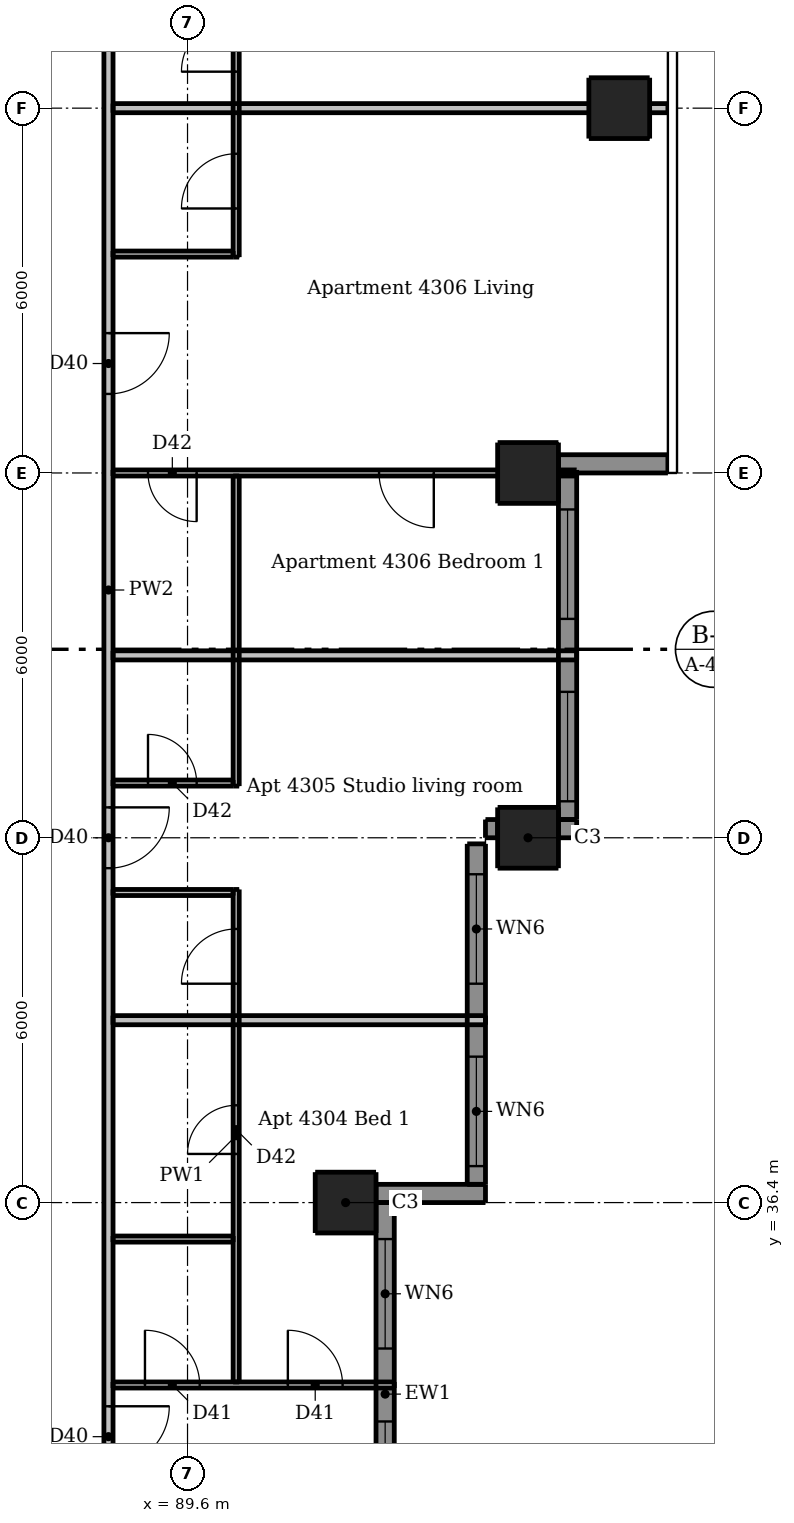
"""IFC4 building model, lengths in metres.
Left out: names, types, materials, properties, quantities, classifications, styles, units other than length and angle.
Written with IfcOpenShell. Run it as: python <this file> out.ifc"""

import sys

from ifc_helpers import new_model, si_unit, direction, frame, frame_2d, origin, origin_2d, place, context, subcontext, project, spatial, rectangle, extrude, element, fill, save


model = new_model("IFC4")
c1 = context("Model", 3, precision=1e-05, world=origin(), true_north=direction((0.0, 1.0)))
c2 = subcontext(c1, "Body", "Model", "MODEL_VIEW")
j1 = project(units=[si_unit("LENGTHUNIT", "METRE"), si_unit("PLANEANGLEUNIT", "RADIAN")], contexts=[c1])
p1 = place(None, origin())
s1 = spatial("IfcSite", under=j1, at=p1, CompositionType="ELEMENT")
p2 = place(p1, origin())
s2 = spatial("IfcBuilding", under=s1, at=p2, CompositionType="ELEMENT")
p3 = place(p2, frame((0.0, 0.0, 161.5)))
s3 = spatial("IfcBuildingStorey", under=s2, at=p3, CompositionType="ELEMENT", Elevation=161.5)
p4 = place(p3, frame((92.2, 36.4, 0.0), z_axis=(0.0, 0.0, 1.0), x_axis=(1.0, 0.0, 0.0)))
e1 = element("IfcColumn", 1, at=p4, inside=s3, PredefinedType="COLUMN", context=c2, shape_type="SweptSolid", body=[
    extrude(rectangle(XDim=1.0, YDim=1.0, at=origin_2d()), origin(), (0.0, 0.0, 1.0), 3.05),
])
p5 = place(p3, frame((95.2, 42.4, 0.0), z_axis=(0.0, 0.0, 1.0), x_axis=(1.0, 0.0, 0.0)))
e2 = element("IfcColumn", 2, at=p5, inside=s3, PredefinedType="COLUMN", context=c2, shape_type="SweptSolid", body=[
    extrude(rectangle(XDim=1.0, YDim=1.0, at=origin_2d()), origin(), (0.0, 0.0, 1.0), 3.3),
])
for number, where, z_axis, x_axis in (
    (3, (95.2, 48.4, 0.0), (0.0, 0.0, 1.0), (1.0, 0.0, 0.0)),
    (4, (96.7, 54.4, 0.0), (0.0, 0.0, 1.0), (1.0, 0.0, 0.0)),
):
    element("IfcColumn", number, at=place(p3, frame(where, z_axis=z_axis, x_axis=x_axis)), inside=s3, PredefinedType="COLUMN", context=c2, shape_type="SweptSolid", body=[
        extrude(rectangle(XDim=1.0, YDim=1.0, at=origin_2d()), origin(), (0.0, 0.0, 1.0), 3.05),
    ])
p6 = place(p3, frame((92.7, 36.55, 0.0), z_axis=(0.0, 0.0, 1.0), x_axis=(1.0, 0.0, 0.0)))
e5 = element("IfcWall", 5, at=p6, inside=s3, PredefinedType="SOLIDWALL", context=c2, shape_type="SweptSolid", body=[
    extrude(rectangle(XDim=1.8, YDim=0.3, at=frame_2d((0.9, 0.0))), origin(), (0.0, 0.0, 1.0), 3.05),
])
p7 = place(p3, frame((94.5, 42.55, 0.0), z_axis=(0.0, 0.0, 1.0), x_axis=(1.0, 0.0, 0.0)))
e6 = element("IfcWall", 6, at=p7, inside=s3, PredefinedType="SOLIDWALL", context=c2, shape_type="SweptSolid", body=[
    extrude(rectangle(XDim=0.2, YDim=0.3, at=frame_2d((0.1, 0.0))), origin(), (0.0, 0.0, 1.0), 3.05),
])
p8 = place(p3, frame((95.7, 42.55, 0.0), z_axis=(0.0, 0.0, 1.0), x_axis=(1.0, 0.0, 0.0)))
e7 = element("IfcWall", 7, at=p8, inside=s3, PredefinedType="SOLIDWALL", context=c2, shape_type="SweptSolid", body=[
    extrude(rectangle(XDim=0.3, YDim=0.3, at=frame_2d((0.15, 0.0))), origin(), (0.0, 0.0, 1.0), 3.05),
])
p9 = place(p3, frame((95.7, 48.55, 0.0), z_axis=(0.0, 0.0, 1.0), x_axis=(1.0, 0.0, 0.0)))
e8 = element("IfcWall", 8, at=p9, inside=s3, PredefinedType="SOLIDWALL", context=c2, shape_type="SweptSolid", body=[
    extrude(rectangle(XDim=1.8, YDim=0.3, at=frame_2d((0.9, 0.0))), origin(), (0.0, 0.0, 1.0), 3.05),
])
p10 = place(p3, frame((92.85, 30.1, 0.0), z_axis=(0.0, 0.0, 1.0), x_axis=(0.0, 1.0, 0.0)))
e9 = element("IfcWall", 9, at=p10, inside=s3, PredefinedType="SOLIDWALL", context=c2, shape_type="SweptSolid", body=[
    extrude(rectangle(XDim=6.3, YDim=0.3, at=frame_2d((3.15, 0.0))), origin(), (0.0, 0.0, 1.0), 3.05),
])
p11 = place(p10, frame((0.9, 0.0, 0.15)))
e10 = element("IfcOpeningElement", 10, at=p11, cuts=e9, PredefinedType="OPENING", context=c2, shape_type="SweptSolid", body=[
    extrude(rectangle(XDim=1.8, YDim=2.1, at=frame_2d((0.9, 1.05))), frame((0.0, 0.16, 0.0), z_axis=(0.0, -1.0, 0.0), x_axis=(1.0, 0.0, 0.0)), (0.0, 0.0, 1.0), 0.32),
])
p12 = place(p10, frame((3.9, 0.0, 0.15)))
e11 = element("IfcOpeningElement", 11, at=p12, cuts=e9, PredefinedType="OPENING", context=c2, shape_type="SweptSolid", body=[
    extrude(rectangle(XDim=1.8, YDim=2.1, at=frame_2d((0.9, 1.05))), frame((0.0, 0.16, 0.0), z_axis=(0.0, -1.0, 0.0), x_axis=(1.0, 0.0, 0.0)), (0.0, 0.0, 1.0), 0.32),
])
p13 = place(p3, frame((94.35, 36.7, 0.0), z_axis=(0.0, 0.0, 1.0), x_axis=(0.0, 1.0, 0.0)))
e12 = element("IfcWall", 12, at=p13, inside=s3, PredefinedType="SOLIDWALL", context=c2, shape_type="SweptSolid", body=[
    extrude(rectangle(XDim=5.6, YDim=0.3, at=frame_2d((2.8, 0.0))), origin(), (0.0, 0.0, 1.0), 3.05),
])
p14 = place(p13, frame((0.3, 0.0, 0.15)))
e13 = element("IfcOpeningElement", 13, at=p14, cuts=e12, PredefinedType="OPENING", context=c2, shape_type="SweptSolid", body=[
    extrude(rectangle(XDim=1.8, YDim=2.1, at=frame_2d((0.9, 1.05))), frame((0.0, 0.16, 0.0), z_axis=(0.0, -1.0, 0.0), x_axis=(1.0, 0.0, 0.0)), (0.0, 0.0, 1.0), 0.32),
])
p15 = place(p13, frame((3.3, 0.0, 0.15)))
e14 = element("IfcOpeningElement", 14, at=p15, cuts=e12, PredefinedType="OPENING", context=c2, shape_type="SweptSolid", body=[
    extrude(rectangle(XDim=1.8, YDim=2.1, at=frame_2d((0.9, 1.05))), frame((0.0, 0.16, 0.0), z_axis=(0.0, -1.0, 0.0), x_axis=(1.0, 0.0, 0.0)), (0.0, 0.0, 1.0), 0.32),
])
p16 = place(p3, frame((95.85, 42.7, 0.0), z_axis=(0.0, 0.0, 1.0), x_axis=(0.0, 1.0, 0.0)))
e15 = element("IfcWall", 15, at=p16, inside=s3, PredefinedType="SOLIDWALL", context=c2, shape_type="SweptSolid", body=[
    extrude(rectangle(XDim=5.7, YDim=0.3, at=frame_2d((2.85, 0.0))), origin(), (0.0, 0.0, 1.0), 3.05),
])
p17 = place(p16, frame((0.3, 0.0, 0.15)))
e16 = element("IfcOpeningElement", 16, at=p17, cuts=e15, PredefinedType="OPENING", context=c2, shape_type="SweptSolid", body=[
    extrude(rectangle(XDim=1.8, YDim=2.1, at=frame_2d((0.9, 1.05))), frame((0.0, 0.16, 0.0), z_axis=(0.0, -1.0, 0.0), x_axis=(1.0, 0.0, 0.0)), (0.0, 0.0, 1.0), 0.32),
])
p18 = place(p16, frame((3.3, 0.0, 0.15)))
e17 = element("IfcOpeningElement", 17, at=p18, cuts=e15, PredefinedType="OPENING", context=c2, shape_type="SweptSolid", body=[
    extrude(rectangle(XDim=1.8, YDim=2.1, at=frame_2d((0.9, 1.05))), frame((0.0, 0.16, 0.0), z_axis=(0.0, -1.0, 0.0), x_axis=(1.0, 0.0, 0.0)), (0.0, 0.0, 1.0), 0.32),
])
p19 = place(p3, frame((90.4, 33.45, 0.0), z_axis=(0.0, 0.0, 1.0), x_axis=(0.0, 1.0, 0.0)))
e18 = element("IfcWall", 18, at=p19, inside=s3, PredefinedType="PARTITIONING", context=c2, shape_type="SweptSolid", body=[
    extrude(rectangle(XDim=8.1, YDim=0.1, at=frame_2d((4.05, 0.0))), origin(), (0.0, 0.0, 1.0), 3.05),
])
p20 = place(p19, frame((3.75, 0.0, 0.0)))
e19 = element("IfcOpeningElement", 19, at=p20, cuts=e18, PredefinedType="OPENING", context=c2, shape_type="SweptSolid", body=[
    extrude(rectangle(XDim=0.8, YDim=2.1, at=frame_2d((0.4, 1.05))), frame((0.0, 0.06, 0.0), z_axis=(0.0, -1.0, 0.0), x_axis=(1.0, 0.0, 0.0)), (0.0, 0.0, 1.0), 0.12),
])
p21 = place(p19, frame((6.55, 0.0, 0.0)))
e20 = element("IfcOpeningElement", 20, at=p21, cuts=e18, PredefinedType="OPENING", context=c2, shape_type="SweptSolid", body=[
    extrude(rectangle(XDim=0.9, YDim=2.1, at=frame_2d((0.45, 1.05))), frame((0.0, 0.06, 0.0), z_axis=(0.0, -1.0, 0.0), x_axis=(1.0, 0.0, 0.0)), (0.0, 0.0, 1.0), 0.12),
])
p22 = place(p3, frame((90.4, 43.25, 0.0), z_axis=(0.0, 0.0, 1.0), x_axis=(0.0, 1.0, 0.0)))
e21 = element("IfcWall", 21, at=p22, inside=s3, PredefinedType="PARTITIONING", context=c2, shape_type="SweptSolid", body=[
    extrude(rectangle(XDim=5.1, YDim=0.1, at=frame_2d((2.55, 0.0))), origin(), (0.0, 0.0, 1.0), 3.05),
])
p23 = place(p3, frame((90.4, 51.95, 0.0), z_axis=(0.0, 0.0, 1.0), x_axis=(0.0, 1.0, 0.0)))
e22 = element("IfcWall", 22, at=p23, inside=s3, PredefinedType="PARTITIONING", context=c2, shape_type="SweptSolid", body=[
    extrude(rectangle(XDim=4.6, YDim=0.1, at=frame_2d((2.3, 0.0))), origin(), (0.0, 0.0, 1.0), 3.05),
])
p24 = place(p23, frame((0.8, 0.0, 0.0)))
e23 = element("IfcOpeningElement", 23, at=p24, cuts=e22, PredefinedType="OPENING", context=c2, shape_type="SweptSolid", body=[
    extrude(rectangle(XDim=0.9, YDim=2.1, at=frame_2d((0.45, 1.05))), frame((0.0, 0.06, 0.0), z_axis=(0.0, -1.0, 0.0), x_axis=(1.0, 0.0, 0.0)), (0.0, 0.0, 1.0), 0.12),
])
p25 = place(p23, frame((3.05, 0.0, 0.0)))
e24 = element("IfcOpeningElement", 24, at=p25, cuts=e22, PredefinedType="OPENING", context=c2, shape_type="SweptSolid", body=[
    extrude(rectangle(XDim=0.9, YDim=2.1, at=frame_2d((0.45, 1.05))), frame((0.0, 0.06, 0.0), z_axis=(0.0, -1.0, 0.0), x_axis=(1.0, 0.0, 0.0)), (0.0, 0.0, 1.0), 0.12),
])
p26 = place(p3, frame((88.375, 52.0, 0.0), z_axis=(0.0, 0.0, 1.0), x_axis=(1.0, 0.0, 0.0)))
e25 = element("IfcWall", 25, at=p26, inside=s3, PredefinedType="PARTITIONING", context=c2, shape_type="SweptSolid", body=[
    extrude(rectangle(XDim=1.975, YDim=0.1, at=frame_2d((0.988, 0.0))), origin(), (0.0, 0.0, 1.0), 3.05),
])
p27 = place(p3, frame((96.0, 48.4, 0.0), z_axis=(0.0, 0.0, 1.0), x_axis=(-1.0, 0.0, 0.0)))
e26 = element("IfcWall", 26, at=p27, inside=s3, PredefinedType="PARTITIONING", context=c2, shape_type="SweptSolid", body=[
    extrude(rectangle(XDim=7.625, YDim=0.1, at=frame_2d((3.812, 0.0))), origin(), (0.0, 0.0, 1.0), 2.59),
])
p28 = place(p27, frame((2.35, 0.0, 0.0)))
e27 = element("IfcOpeningElement", 27, at=p28, cuts=e26, PredefinedType="OPENING", context=c2, shape_type="SweptSolid", body=[
    extrude(rectangle(XDim=0.9, YDim=2.1, at=frame_2d((0.45, 1.05))), frame((0.0, 0.06, 0.0), z_axis=(0.0, -1.0, 0.0), x_axis=(1.0, 0.0, 0.0)), (0.0, 0.0, 1.0), 0.12),
])
p29 = place(p27, frame((6.25, 0.0, 0.0)))
e28 = element("IfcOpeningElement", 28, at=p29, cuts=e26, PredefinedType="OPENING", context=c2, shape_type="SweptSolid", body=[
    extrude(rectangle(XDim=0.8, YDim=2.1, at=frame_2d((0.4, 1.05))), frame((0.0, 0.06, 0.0), z_axis=(0.0, -1.0, 0.0), x_axis=(1.0, 0.0, 0.0)), (0.0, 0.0, 1.0), 0.12),
])
p30 = place(p3, frame((88.375, 43.3, 0.0), z_axis=(0.0, 0.0, 1.0), x_axis=(1.0, 0.0, 0.0)))
e29 = element("IfcWall", 29, at=p30, inside=s3, PredefinedType="PARTITIONING", context=c2, shape_type="SweptSolid", body=[
    extrude(rectangle(XDim=1.975, YDim=0.1, at=frame_2d((0.988, 0.0))), origin(), (0.0, 0.0, 1.0), 3.05),
])
p31 = place(p30, frame((0.575, 0.0, 0.0)))
e30 = element("IfcOpeningElement", 30, at=p31, cuts=e29, PredefinedType="OPENING", context=c2, shape_type="SweptSolid", body=[
    extrude(rectangle(XDim=0.8, YDim=2.1, at=frame_2d((0.4, 1.05))), frame((0.0, 0.06, 0.0), z_axis=(0.0, -1.0, 0.0), x_axis=(1.0, 0.0, 0.0)), (0.0, 0.0, 1.0), 0.12),
])
for number, where, z_axis, x_axis in (
    (31, (88.375, 41.5, 0.0), (0.0, 0.0, 1.0), (1.0, 0.0, 0.0)),
    (32, (88.375, 35.8, 0.0), (0.0, 0.0, 1.0), (1.0, 0.0, 0.0)),
):
    element("IfcWall", number, at=place(p3, frame(where, z_axis=z_axis, x_axis=x_axis)), inside=s3, PredefinedType="PARTITIONING", context=c2, shape_type="SweptSolid", body=[
        extrude(rectangle(XDim=1.975, YDim=0.1, at=frame_2d((0.988, 0.0))), origin(), (0.0, 0.0, 1.0), 3.05),
    ])
p32 = place(p3, frame((88.375, 33.4, 0.0), z_axis=(0.0, 0.0, 1.0), x_axis=(1.0, 0.0, 0.0)))
e33 = element("IfcWall", 33, at=p32, inside=s3, PredefinedType="PARTITIONING", context=c2, shape_type="SweptSolid", body=[
    extrude(rectangle(XDim=4.625, YDim=0.1, at=frame_2d((2.312, 0.0))), origin(), (0.0, 0.0, 1.0), 3.05),
])
p33 = place(p32, frame((0.525, 0.0, 0.0)))
e34 = element("IfcOpeningElement", 34, at=p33, cuts=e33, PredefinedType="OPENING", context=c2, shape_type="SweptSolid", body=[
    extrude(rectangle(XDim=0.9, YDim=2.1, at=frame_2d((0.45, 1.05))), frame((0.0, 0.06, 0.0), z_axis=(0.0, -1.0, 0.0), x_axis=(1.0, 0.0, 0.0)), (0.0, 0.0, 1.0), 0.12),
])
p34 = place(p32, frame((2.875, 0.0, 0.0)))
e35 = element("IfcOpeningElement", 35, at=p34, cuts=e33, PredefinedType="OPENING", context=c2, shape_type="SweptSolid", body=[
    extrude(rectangle(XDim=0.9, YDim=2.1, at=frame_2d((0.45, 1.05))), frame((0.0, 0.06, 0.0), z_axis=(0.0, -1.0, 0.0), x_axis=(1.0, 0.0, 0.0)), (0.0, 0.0, 1.0), 0.12),
])
p35 = place(p3, frame((88.3, 61.175, 0.0), z_axis=(0.0, 0.0, 1.0), x_axis=(0.0, -1.0, 0.0)))
e36 = element("IfcWall", 36, at=p35, inside=s3, PredefinedType="PARTITIONING", context=c2, shape_type="SweptSolid", body=[
    extrude(rectangle(XDim=29.4, YDim=0.15, at=frame_2d((14.7, 0.0))), origin(), (0.0, 0.0, 1.0), 3.05),
])
p36 = place(p35, frame((28.125, 0.0, 0.0)))
e37 = element("IfcOpeningElement", 37, at=p36, cuts=e36, PredefinedType="OPENING", context=c2, shape_type="SweptSolid", body=[
    extrude(rectangle(XDim=1.0, YDim=2.1, at=frame_2d((0.5, 1.05))), frame((0.0, 0.085, 0.0), z_axis=(0.0, -1.0, 0.0), x_axis=(1.0, 0.0, 0.0)), (0.0, 0.0, 1.0), 0.17),
])
p37 = place(p35, frame((18.275, 0.0, 0.0)))
e38 = element("IfcOpeningElement", 38, at=p37, cuts=e36, PredefinedType="OPENING", context=c2, shape_type="SweptSolid", body=[
    extrude(rectangle(XDim=1.0, YDim=2.1, at=frame_2d((0.5, 1.05))), frame((0.0, 0.085, 0.0), z_axis=(0.0, -1.0, 0.0), x_axis=(1.0, 0.0, 0.0)), (0.0, 0.0, 1.0), 0.17),
])
p38 = place(p35, frame((10.475, 0.0, 0.0)))
e39 = element("IfcOpeningElement", 39, at=p38, cuts=e36, PredefinedType="OPENING", context=c2, shape_type="SweptSolid", body=[
    extrude(rectangle(XDim=1.0, YDim=2.1, at=frame_2d((0.5, 1.05))), frame((0.0, 0.085, 0.0), z_axis=(0.0, -1.0, 0.0), x_axis=(1.0, 0.0, 0.0)), (0.0, 0.0, 1.0), 0.17),
])
p39 = place(p35, frame((3.275, 0.0, 0.0)))
e40 = element("IfcOpeningElement", 40, at=p39, cuts=e36, PredefinedType="OPENING", context=c2, shape_type="SweptSolid", body=[
    extrude(rectangle(XDim=1.0, YDim=2.1, at=frame_2d((0.5, 1.05))), frame((0.0, 0.085, 0.0), z_axis=(0.0, -1.0, 0.0), x_axis=(1.0, 0.0, 0.0)), (0.0, 0.0, 1.0), 0.17),
])
p40 = place(p3, frame((88.375, 54.4, 0.0), z_axis=(0.0, 0.0, 1.0), x_axis=(1.0, 0.0, 0.0)))
e41 = element("IfcWall", 41, at=p40, inside=s3, PredefinedType="PARTITIONING", context=c2, shape_type="SweptSolid", body=[
    extrude(rectangle(XDim=9.125, YDim=0.15, at=frame_2d((4.562, 0.0))), origin(), (0.0, 0.0, 1.0), 2.516),
])
p41 = place(p3, frame((88.375, 45.4, 0.0), z_axis=(0.0, 0.0, 1.0), x_axis=(1.0, 0.0, 0.0)))
e42 = element("IfcWall", 42, at=p41, inside=s3, PredefinedType="PARTITIONING", context=c2, shape_type="SweptSolid", body=[
    extrude(rectangle(XDim=7.625, YDim=0.15, at=frame_2d((3.812, 0.0))), origin(), (0.0, 0.0, 1.0), 3.05),
])
p42 = place(p3, frame((88.375, 39.4, 0.0), z_axis=(0.0, 0.0, 1.0), x_axis=(1.0, 0.0, 0.0)))
e43 = element("IfcWall", 43, at=p42, inside=s3, PredefinedType="PARTITIONING", context=c2, shape_type="SweptSolid", body=[
    extrude(rectangle(XDim=6.125, YDim=0.15, at=frame_2d((3.062, 0.0))), origin(), (0.0, 0.0, 1.0), 3.05),
])
p43 = place(p11, origin())
e44 = element("IfcWindow", 44, at=p43, inside=s3, PartitioningType="DOUBLE_PANEL_VERTICAL", PredefinedType="WINDOW", context=c2, shape_type="SweptSolid", body=[
    extrude(rectangle(XDim=1.8, YDim=2.1, at=frame_2d((0.9, 1.05))), frame((0.0, 0.03, 0.0), z_axis=(0.0, -1.0, 0.0), x_axis=(1.0, 0.0, 0.0)), (0.0, 0.0, 1.0), 0.06),
])
fill(e10, e44)
p44 = place(p12, origin())
e45 = element("IfcWindow", 45, at=p44, inside=s3, PartitioningType="DOUBLE_PANEL_VERTICAL", PredefinedType="WINDOW", context=c2, shape_type="SweptSolid", body=[
    extrude(rectangle(XDim=1.8, YDim=2.1, at=frame_2d((0.9, 1.05))), frame((0.0, 0.03, 0.0), z_axis=(0.0, -1.0, 0.0), x_axis=(1.0, 0.0, 0.0)), (0.0, 0.0, 1.0), 0.06),
])
fill(e11, e45)
p45 = place(p14, origin())
e46 = element("IfcWindow", 46, at=p45, inside=s3, PartitioningType="DOUBLE_PANEL_VERTICAL", PredefinedType="WINDOW", context=c2, shape_type="SweptSolid", body=[
    extrude(rectangle(XDim=1.8, YDim=2.1, at=frame_2d((0.9, 1.05))), frame((0.0, 0.03, 0.0), z_axis=(0.0, -1.0, 0.0), x_axis=(1.0, 0.0, 0.0)), (0.0, 0.0, 1.0), 0.06),
])
fill(e13, e46)
p46 = place(p15, origin())
e47 = element("IfcWindow", 47, at=p46, inside=s3, PartitioningType="DOUBLE_PANEL_VERTICAL", PredefinedType="WINDOW", context=c2, shape_type="SweptSolid", body=[
    extrude(rectangle(XDim=1.8, YDim=2.1, at=frame_2d((0.9, 1.05))), frame((0.0, 0.03, 0.0), z_axis=(0.0, -1.0, 0.0), x_axis=(1.0, 0.0, 0.0)), (0.0, 0.0, 1.0), 0.06),
])
fill(e14, e47)
p47 = place(p17, origin())
e48 = element("IfcWindow", 48, at=p47, inside=s3, PartitioningType="DOUBLE_PANEL_VERTICAL", PredefinedType="WINDOW", context=c2, shape_type="SweptSolid", body=[
    extrude(rectangle(XDim=1.8, YDim=2.1, at=frame_2d((0.9, 1.05))), frame((0.0, 0.03, 0.0), z_axis=(0.0, -1.0, 0.0), x_axis=(1.0, 0.0, 0.0)), (0.0, 0.0, 1.0), 0.06),
])
fill(e16, e48)
p48 = place(p18, origin())
e49 = element("IfcWindow", 49, at=p48, inside=s3, PartitioningType="DOUBLE_PANEL_VERTICAL", PredefinedType="WINDOW", context=c2, shape_type="SweptSolid", body=[
    extrude(rectangle(XDim=1.8, YDim=2.1, at=frame_2d((0.9, 1.05))), frame((0.0, 0.03, 0.0), z_axis=(0.0, -1.0, 0.0), x_axis=(1.0, 0.0, 0.0)), (0.0, 0.0, 1.0), 0.06),
])
fill(e17, e49)
p49 = place(p36, origin())
e50 = element("IfcDoor", 50, at=p49, inside=s3, OperationType="SINGLE_SWING_LEFT", PredefinedType="DOOR", context=c2, shape_type="SweptSolid", body=[
    extrude(rectangle(XDim=1.0, YDim=2.1, at=frame_2d((0.5, 1.05))), frame((0.0, 0.025, 0.0), z_axis=(0.0, -1.0, 0.0), x_axis=(1.0, 0.0, 0.0)), (0.0, 0.0, 1.0), 0.05),
])
fill(e37, e50)
p50 = place(p33, origin())
e51 = element("IfcDoor", 51, at=p50, inside=s3, OperationType="SINGLE_SWING_LEFT", PredefinedType="DOOR", context=c2, shape_type="SweptSolid", body=[
    extrude(rectangle(XDim=0.9, YDim=2.1, at=frame_2d((0.45, 1.05))), frame((0.0, 0.025, 0.0), z_axis=(0.0, -1.0, 0.0), x_axis=(1.0, 0.0, 0.0)), (0.0, 0.0, 1.0), 0.05),
])
fill(e34, e51)
p51 = place(p34, origin())
e52 = element("IfcDoor", 52, at=p51, inside=s3, OperationType="SINGLE_SWING_LEFT", PredefinedType="DOOR", context=c2, shape_type="SweptSolid", body=[
    extrude(rectangle(XDim=0.9, YDim=2.1, at=frame_2d((0.45, 1.05))), frame((0.0, 0.025, 0.0), z_axis=(0.0, -1.0, 0.0), x_axis=(1.0, 0.0, 0.0)), (0.0, 0.0, 1.0), 0.05),
])
fill(e35, e52)
p52 = place(p20, origin())
e53 = element("IfcDoor", 53, at=p52, inside=s3, OperationType="SINGLE_SWING_LEFT", PredefinedType="DOOR", context=c2, shape_type="SweptSolid", body=[
    extrude(rectangle(XDim=0.8, YDim=2.1, at=frame_2d((0.4, 1.05))), frame((0.0, 0.025, 0.0), z_axis=(0.0, -1.0, 0.0), x_axis=(1.0, 0.0, 0.0)), (0.0, 0.0, 1.0), 0.05),
])
fill(e19, e53)
p53 = place(p37, origin())
e54 = element("IfcDoor", 54, at=p53, inside=s3, OperationType="SINGLE_SWING_LEFT", PredefinedType="DOOR", context=c2, shape_type="SweptSolid", body=[
    extrude(rectangle(XDim=1.0, YDim=2.1, at=frame_2d((0.5, 1.05))), frame((0.0, 0.025, 0.0), z_axis=(0.0, -1.0, 0.0), x_axis=(1.0, 0.0, 0.0)), (0.0, 0.0, 1.0), 0.05),
])
fill(e38, e54)
p54 = place(p21, origin())
e55 = element("IfcDoor", 55, at=p54, inside=s3, OperationType="SINGLE_SWING_LEFT", PredefinedType="DOOR", context=c2, shape_type="SweptSolid", body=[
    extrude(rectangle(XDim=0.9, YDim=2.1, at=frame_2d((0.45, 1.05))), frame((0.0, 0.025, 0.0), z_axis=(0.0, -1.0, 0.0), x_axis=(1.0, 0.0, 0.0)), (0.0, 0.0, 1.0), 0.05),
])
fill(e20, e55)
p55 = place(p31, origin())
e56 = element("IfcDoor", 56, at=p55, inside=s3, OperationType="SINGLE_SWING_LEFT", PredefinedType="DOOR", context=c2, shape_type="SweptSolid", body=[
    extrude(rectangle(XDim=0.8, YDim=2.1, at=frame_2d((0.4, 1.05))), frame((0.0, 0.025, 0.0), z_axis=(0.0, -1.0, 0.0), x_axis=(1.0, 0.0, 0.0)), (0.0, 0.0, 1.0), 0.05),
])
fill(e30, e56)
p56 = place(p38, origin())
e57 = element("IfcDoor", 57, at=p56, inside=s3, OperationType="SINGLE_SWING_LEFT", PredefinedType="DOOR", context=c2, shape_type="SweptSolid", body=[
    extrude(rectangle(XDim=1.0, YDim=2.1, at=frame_2d((0.5, 1.05))), frame((0.0, 0.025, 0.0), z_axis=(0.0, -1.0, 0.0), x_axis=(1.0, 0.0, 0.0)), (0.0, 0.0, 1.0), 0.05),
])
fill(e39, e57)
p57 = place(p24, origin())
e58 = element("IfcDoor", 58, at=p57, inside=s3, OperationType="SINGLE_SWING_LEFT", PredefinedType="DOOR", context=c2, shape_type="SweptSolid", body=[
    extrude(rectangle(XDim=0.9, YDim=2.1, at=frame_2d((0.45, 1.05))), frame((0.0, 0.025, 0.0), z_axis=(0.0, -1.0, 0.0), x_axis=(1.0, 0.0, 0.0)), (0.0, 0.0, 1.0), 0.05),
])
fill(e23, e58)
p58 = place(p28, origin())
e59 = element("IfcDoor", 59, at=p58, inside=s3, OperationType="SINGLE_SWING_LEFT", PredefinedType="DOOR", context=c2, shape_type="SweptSolid", body=[
    extrude(rectangle(XDim=0.9, YDim=2.1, at=frame_2d((0.45, 1.05))), frame((0.0, 0.025, 0.0), z_axis=(0.0, -1.0, 0.0), x_axis=(1.0, 0.0, 0.0)), (0.0, 0.0, 1.0), 0.05),
])
fill(e27, e59)
p59 = place(p29, origin())
e60 = element("IfcDoor", 60, at=p59, inside=s3, OperationType="SINGLE_SWING_LEFT", PredefinedType="DOOR", context=c2, shape_type="SweptSolid", body=[
    extrude(rectangle(XDim=0.8, YDim=2.1, at=frame_2d((0.4, 1.05))), frame((0.0, 0.025, 0.0), z_axis=(0.0, -1.0, 0.0), x_axis=(1.0, 0.0, 0.0)), (0.0, 0.0, 1.0), 0.05),
])
fill(e28, e60)
p60 = place(p25, origin())
e61 = element("IfcDoor", 61, at=p60, inside=s3, OperationType="SINGLE_SWING_LEFT", PredefinedType="DOOR", context=c2, shape_type="SweptSolid", body=[
    extrude(rectangle(XDim=0.9, YDim=2.1, at=frame_2d((0.45, 1.05))), frame((0.0, 0.025, 0.0), z_axis=(0.0, -1.0, 0.0), x_axis=(1.0, 0.0, 0.0)), (0.0, 0.0, 1.0), 0.05),
])
fill(e24, e61)
save(model, sys.argv[1])
